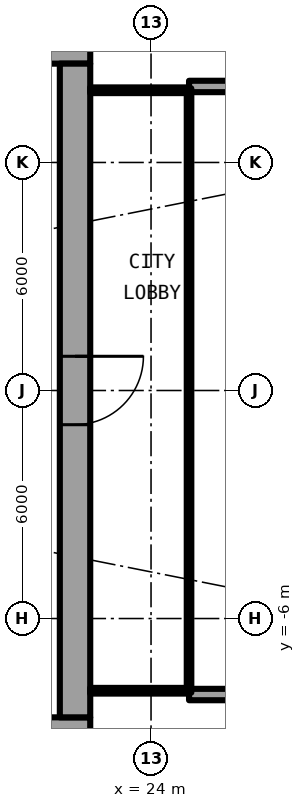
"""IFC4 building model, lengths in metres.
Left out: names, types, materials, properties, quantities, classifications, styles, units other than length and angle.
Written with IfcOpenShell. Run it as: python <this file> out.ifc"""

import sys

from ifc_helpers import new_model, si_unit, direction, frame, frame_2d, origin, place, context, subcontext, project, spatial, rectangle, extrude, element, fill, save


model = new_model("IFC4")
c1 = context("Model", 3, precision=1e-05, world=origin(), true_north=direction((0.0, 1.0)))
c2 = subcontext(c1, "Body", "Model", "MODEL_VIEW")
j1 = project(units=[si_unit("LENGTHUNIT", "METRE"), si_unit("PLANEANGLEUNIT", "RADIAN")], contexts=[c1])
p1 = place(None, origin())
s1 = spatial("IfcSite", under=j1, at=p1, CompositionType="ELEMENT")
p2 = place(p1, origin())
s2 = spatial("IfcBuilding", under=s1, at=p2, CompositionType="ELEMENT")
p3 = place(p2, frame((0.0, 0.0, 31.95)))
s3 = spatial("IfcBuildingStorey", under=s2, at=p3, CompositionType="ELEMENT", Elevation=31.95)
for number, where, z_axis, x_axis in (
    (1, (25.0, 8.0, 0.0), (0.0, 0.0, 1.0), (1.0, 0.0, 0.0)),
    (2, (25.0, -8.0, 0.0), (0.0, 0.0, 1.0), (1.0, 0.0, 0.0)),
):
    element("IfcWall", number, at=place(p3, frame(where, z_axis=z_axis, x_axis=x_axis)), inside=s3, PredefinedType="SOLIDWALL", context=c2, shape_type="SweptSolid", body=[
        extrude(rectangle(XDim=2.667, YDim=0.3, at=frame_2d((1.333, 0.0))), origin(), (0.0, 0.0, 1.0), 2.7),
    ])
p4 = place(p3, frame((22.4, 9.0, 0.0), z_axis=(0.0, 0.0, 1.0), x_axis=(-1.0, 0.0, 0.0)))
e3 = element("IfcWall", 3, at=p4, inside=s3, PredefinedType="SHEAR", context=c2, shape_type="SweptSolid", body=[
    extrude(rectangle(XDim=14.2, YDim=0.8, at=frame_2d((7.1, 0.0))), origin(), (0.0, 0.0, 1.0), 3.05),
])
p5 = place(p4, frame((1.325, 0.0, 0.0)))
e4 = element("IfcOpeningElement", 4, at=p5, cuts=e3, PredefinedType="OPENING", context=c2, shape_type="SweptSolid", body=[
    extrude(rectangle(XDim=1.2, YDim=2.3, at=frame_2d((0.6, 1.15))), frame((0.0, 0.41, 0.0), z_axis=(0.0, -1.0, 0.0), x_axis=(1.0, 0.0, 0.0)), (0.0, 0.0, 1.0), 0.82),
])
p6 = place(p3, frame((8.2, -9.0, 0.0), z_axis=(0.0, 0.0, 1.0), x_axis=(1.0, 0.0, 0.0)))
e5 = element("IfcWall", 5, at=p6, inside=s3, PredefinedType="SHEAR", context=c2, shape_type="SweptSolid", body=[
    extrude(rectangle(XDim=14.2, YDim=0.8, at=frame_2d((7.1, 0.0))), origin(), (0.0, 0.0, 1.0), 3.05),
])
p7 = place(p6, frame((11.675, 0.0, 0.0)))
e6 = element("IfcOpeningElement", 6, at=p7, cuts=e5, PredefinedType="OPENING", context=c2, shape_type="SweptSolid", body=[
    extrude(rectangle(XDim=1.2, YDim=2.3, at=frame_2d((0.6, 1.15))), frame((0.0, 0.41, 0.0), z_axis=(0.0, -1.0, 0.0), x_axis=(1.0, 0.0, 0.0)), (0.0, 0.0, 1.0), 0.82),
])
p8 = place(p3, frame((22.0, 8.6, 0.0), z_axis=(0.0, 0.0, 1.0), x_axis=(0.0, -1.0, 0.0)))
e7 = element("IfcWall", 7, at=p8, inside=s3, PredefinedType="SHEAR", context=c2, shape_type="SweptSolid", body=[
    extrude(rectangle(XDim=17.2, YDim=0.8, at=frame_2d((8.6, 0.0))), origin(), (0.0, 0.0, 1.0), 3.05),
])
p9 = place(p8, frame((7.7, 0.0, 0.0)))
e8 = element("IfcOpeningElement", 8, at=p9, cuts=e7, PredefinedType="OPENING", context=c2, shape_type="SweptSolid", body=[
    extrude(rectangle(XDim=1.8, YDim=2.3, at=frame_2d((0.9, 1.15))), frame((0.0, 0.41, 0.0), z_axis=(0.0, -1.0, 0.0), x_axis=(1.0, 0.0, 0.0)), (0.0, 0.0, 1.0), 0.82),
])
for number, where, z_axis, x_axis in (
    (9, (22.4, -7.9, 0.0), (0.0, 0.0, 1.0), (1.0, 0.0, 0.0)),
    (10, (22.4, 7.9, 0.0), (0.0, 0.0, 1.0), (1.0, 0.0, 0.0)),
):
    element("IfcWall", number, at=place(p3, frame(where, z_axis=z_axis, x_axis=x_axis)), inside=s3, PredefinedType="PARTITIONING", context=c2, shape_type="SweptSolid", body=[
        extrude(rectangle(XDim=2.54, YDim=0.15, at=frame_2d((1.27, 0.0))), origin(), (0.0, 0.0, 1.0), 2.7),
    ])
p10 = place(p3, frame((25.0, -7.95, 0.0), z_axis=(0.0, 0.0, 1.0), x_axis=(0.0, 1.0, 0.0)))
e11 = element("IfcWall", 11, at=p10, inside=s3, PredefinedType="PARTITIONING", context=c2, shape_type="SweptSolid", body=[
    extrude(rectangle(XDim=15.9, YDim=0.12, at=frame_2d((7.95, 0.0))), origin(), (0.0, 0.0, 1.0), 2.7),
])
p11 = place(p10, frame((0.95, 0.0, 0.1)))
e12 = element("IfcOpeningElement", 12, at=p11, cuts=e11, PredefinedType="OPENING", context=c2, shape_type="SweptSolid", body=[
    extrude(rectangle(XDim=14.0, YDim=2.35, at=frame_2d((7.0, 1.175))), frame((0.0, 0.07, 0.0), z_axis=(0.0, -1.0, 0.0), x_axis=(1.0, 0.0, 0.0)), (0.0, 0.0, 1.0), 0.14),
])
p12 = place(p9, origin())
e13 = element("IfcDoor", 13, at=p12, inside=s3, OperationType="SINGLE_SWING_LEFT", PredefinedType="DOOR", context=c2, shape_type="SweptSolid", body=[
    extrude(rectangle(XDim=1.8, YDim=2.3, at=frame_2d((0.9, 1.15))), frame((0.0, 0.025, 0.0), z_axis=(0.0, -1.0, 0.0), x_axis=(1.0, 0.0, 0.0)), (0.0, 0.0, 1.0), 0.05),
])
fill(e8, e13)
p13 = place(p11, origin())
e14 = element("IfcWindow", 14, at=p13, inside=s3, PartitioningType="SINGLE_PANEL", PredefinedType="WINDOW", context=c2, shape_type="SweptSolid", body=[
    extrude(rectangle(XDim=14.0, YDim=2.35, at=frame_2d((7.0, 1.175))), frame((0.0, 0.03, 0.0), z_axis=(0.0, -1.0, 0.0), x_axis=(1.0, 0.0, 0.0)), (0.0, 0.0, 1.0), 0.06),
])
fill(e12, e14)
save(model, sys.argv[1])
